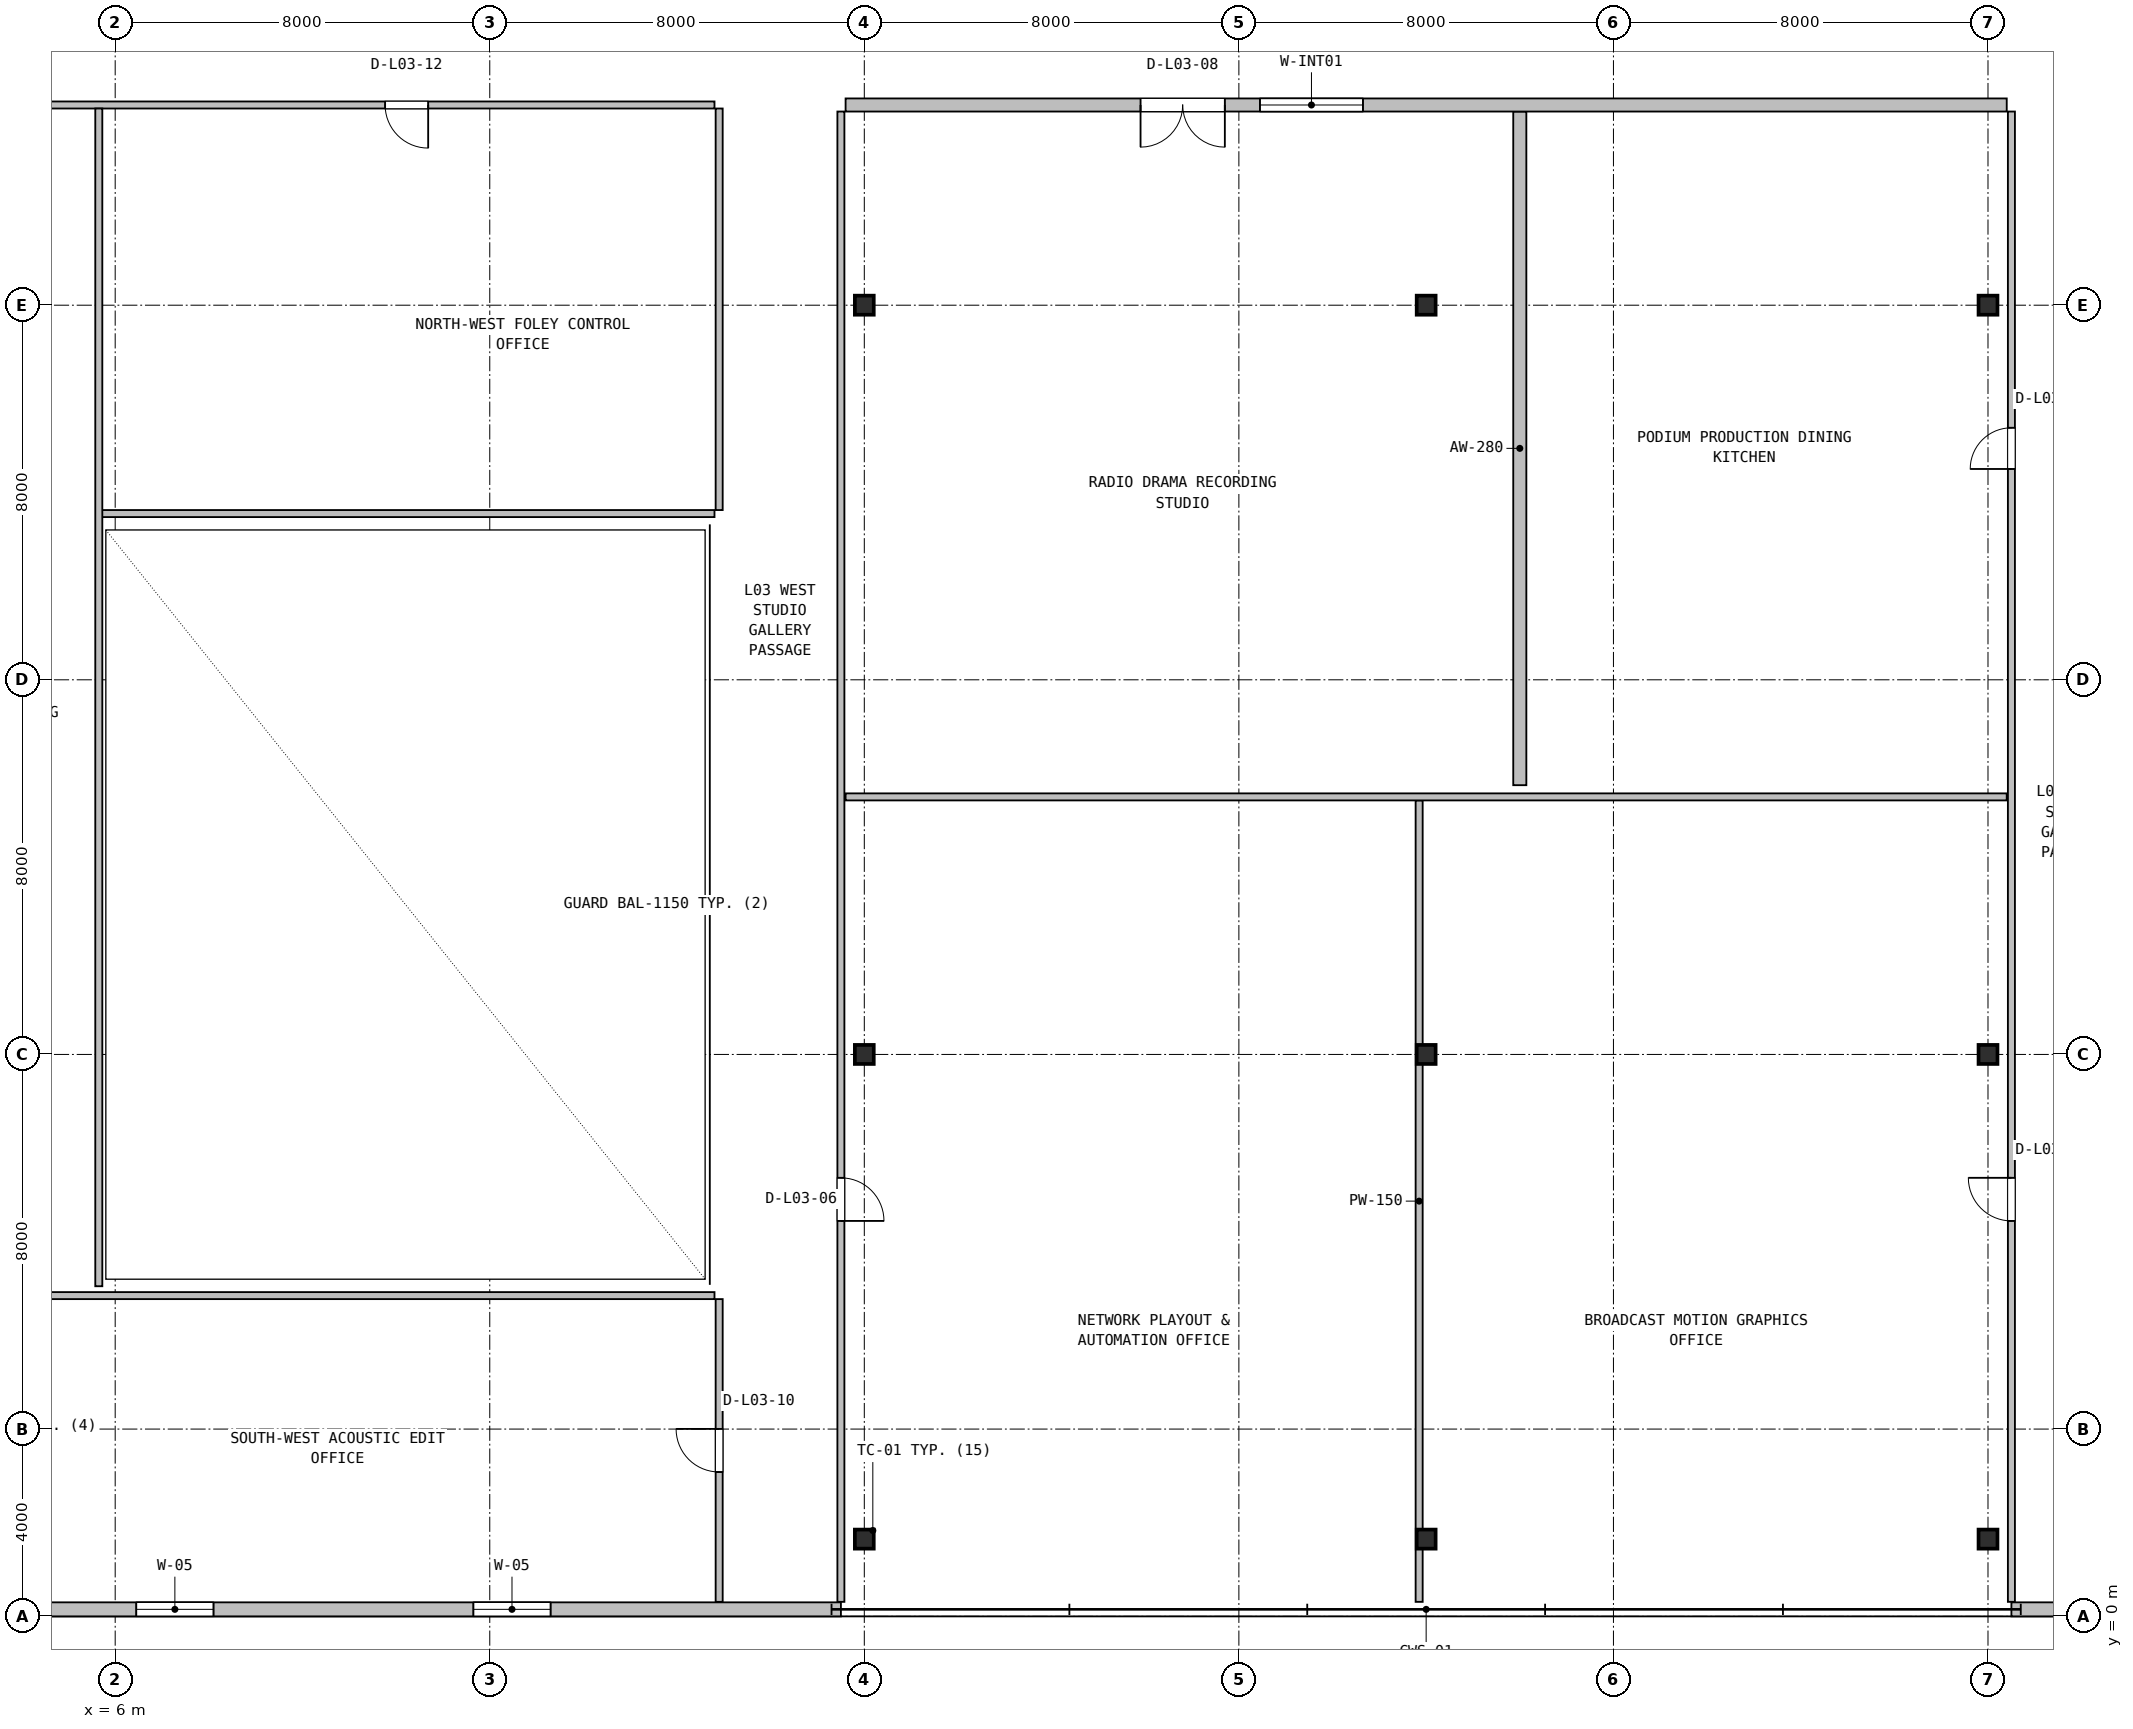
"""IFC4 building model, lengths in metres.
Left out: names, types, materials, properties, quantities, classifications, styles, units other than length and angle.
Written with IfcOpenShell. Run it as: python <this file> out.ifc"""

import sys

from ifc_helpers import new_model, si_unit, direction, frame, frame_2d, origin, origin_2d, place, context, subcontext, project, spatial, rectangle, i_section, extrude, source, transform, mapped, element, fill, save


model = new_model("IFC4")
c1 = context("Model", 3, precision=1e-05, world=origin(), true_north=direction((0.0, 1.0)))
c2 = subcontext(c1, "Body", "Model", "MODEL_VIEW")
j1 = project(units=[si_unit("LENGTHUNIT", "METRE"), si_unit("PLANEANGLEUNIT", "RADIAN")], contexts=[c1])
p1 = place(None, origin())
s1 = spatial("IfcSite", under=j1, at=p1, CompositionType="ELEMENT")
p2 = place(p1, origin())
s2 = spatial("IfcBuilding", under=s1, at=p2, CompositionType="ELEMENT")
p3 = place(p2, frame((0.0, 0.0, 16.8)))
s3 = spatial("IfcBuildingStorey", under=s2, at=p3, CompositionType="ELEMENT", Elevation=16.8)
m1 = source(origin(), c2, "Body", "SweptSolid", [
    extrude(i_section(OverallWidth=0.404, OverallDepth=0.407, WebThickness=0.027, FlangeThickness=0.044, FilletRadius=0.018, at=origin_2d()), origin(), (0.0, 0.0, 1.0), 5.4),
])
for number, where, z_axis, x_axis in (
    (1, (22.0, 1.65, 0.0), (0.0, 0.0, 1.0), (1.0, 0.0, 0.0)),
    (2, (34.0, 1.65, 0.0), (0.0, 0.0, 1.0), (1.0, 0.0, 0.0)),
    (3, (46.0, 1.65, 0.0), (0.0, 0.0, 1.0), (1.0, 0.0, 0.0)),
    (4, (22.0, 12.0, 0.0), (0.0, 0.0, 1.0), (1.0, 0.0, 0.0)),
    (5, (34.0, 12.0, 0.0), (0.0, 0.0, 1.0), (1.0, 0.0, 0.0)),
    (6, (46.0, 12.0, 0.0), (0.0, 0.0, 1.0), (1.0, 0.0, 0.0)),
    (7, (22.0, 28.0, 0.0), (0.0, 0.0, 1.0), (1.0, 0.0, 0.0)),
    (8, (34.0, 28.0, 0.0), (0.0, 0.0, 1.0), (1.0, 0.0, 0.0)),
    (9, (46.0, 28.0, 0.0), (0.0, 0.0, 1.0), (1.0, 0.0, 0.0)),
):
    element("IfcColumn", number, at=place(p3, frame(where, z_axis=z_axis, x_axis=x_axis)), inside=s3, PredefinedType="COLUMN", context=c2, shape_type="MappedRepresentation", body=[
        mapped(m1, transform((0.0, 0.0, 0.0), x_axis=(1.0, 0.0, 0.0), y_axis=(0.0, 1.0, 0.0), z_axis=(0.0, 0.0, 1.0), scale=1.0)),
    ])
p4 = place(p3, frame((2.25, 0.15, 0.0), z_axis=(0.0, 0.0, 1.0), x_axis=(1.0, 0.0, 0.0)))
e10 = element("IfcWall", 10, at=p4, inside=s3, PredefinedType="SOLIDWALL", context=c2, shape_type="SweptSolid", body=[
    extrude(rectangle(XDim=19.25, YDim=0.3, at=frame_2d((9.625, 0.0))), origin(), (0.0, 0.0, 1.0), 5.06),
])
p5 = place(p4, frame((4.2, 0.0, 0.9)))
e11 = element("IfcOpeningElement", 11, at=p5, cuts=e10, PredefinedType="OPENING", context=c2, shape_type="SweptSolid", body=[
    extrude(rectangle(XDim=1.65, YDim=1.8, at=frame_2d((0.825, 0.9))), frame((0.0, 0.16, 0.0), z_axis=(0.0, -1.0, 0.0), x_axis=(1.0, 0.0, 0.0)), (0.0, 0.0, 1.0), 0.32),
])
p6 = place(p4, frame((11.4, 0.0, 0.9)))
e12 = element("IfcOpeningElement", 12, at=p6, cuts=e10, PredefinedType="OPENING", context=c2, shape_type="SweptSolid", body=[
    extrude(rectangle(XDim=1.65, YDim=1.8, at=frame_2d((0.825, 0.9))), frame((0.0, 0.16, 0.0), z_axis=(0.0, -1.0, 0.0), x_axis=(1.0, 0.0, 0.0)), (0.0, 0.0, 1.0), 0.32),
])
p7 = place(p3, frame((46.5, 0.15, 0.0), z_axis=(0.0, 0.0, 1.0), x_axis=(1.0, 0.0, 0.0)))
e13 = element("IfcWall", 13, at=p7, inside=s3, PredefinedType="SOLIDWALL", context=c2, shape_type="SweptSolid", body=[
    extrude(rectangle(XDim=19.25, YDim=0.3, at=frame_2d((9.625, 0.0))), origin(), (0.0, 0.0, 1.0), 5.06),
])
p8 = place(p7, frame((4.2, 0.0, 0.9)))
e14 = element("IfcOpeningElement", 14, at=p8, cuts=e13, PredefinedType="OPENING", context=c2, shape_type="SweptSolid", body=[
    extrude(rectangle(XDim=1.65, YDim=1.8, at=frame_2d((0.825, 0.9))), frame((0.0, 0.16, 0.0), z_axis=(0.0, -1.0, 0.0), x_axis=(1.0, 0.0, 0.0)), (0.0, 0.0, 1.0), 0.32),
])
p9 = place(p7, frame((11.4, 0.0, 0.9)))
e15 = element("IfcOpeningElement", 15, at=p9, cuts=e13, PredefinedType="OPENING", context=c2, shape_type="SweptSolid", body=[
    extrude(rectangle(XDim=1.65, YDim=1.8, at=frame_2d((0.825, 0.9))), frame((0.0, 0.16, 0.0), z_axis=(0.0, -1.0, 0.0), x_axis=(1.0, 0.0, 0.0)), (0.0, 0.0, 1.0), 0.32),
])
p10 = place(p3, frame((33.85, 0.31, 0.0), z_axis=(0.0, 0.0, 1.0), x_axis=(0.0, 1.0, 0.0)))
e16 = element("IfcWall", 16, at=p10, inside=s3, PredefinedType="PARTITIONING", context=c2, shape_type="SweptSolid", body=[
    extrude(rectangle(XDim=17.115, YDim=0.15, at=frame_2d((8.558, 0.0))), origin(), (0.0, 0.0, 1.0), 4.143),
])
p11 = place(p3, frame((21.6, 17.5, 0.0), z_axis=(0.0, 0.0, 1.0), x_axis=(1.0, 0.0, 0.0)))
e17 = element("IfcWall", 17, at=p11, inside=s3, PredefinedType="PARTITIONING", context=c2, shape_type="SweptSolid", body=[
    extrude(rectangle(XDim=24.8, YDim=0.15, at=frame_2d((12.4, 0.0))), origin(), (0.0, 0.0, 1.0), 4.143),
])
p12 = place(p3, frame((21.5, 0.31, 0.0), z_axis=(0.0, 0.0, 1.0), x_axis=(0.0, 1.0, 0.0)))
e18 = element("IfcWall", 18, at=p12, inside=s3, PredefinedType="PARTITIONING", context=c2, shape_type="SweptSolid", body=[
    extrude(rectangle(XDim=31.825, YDim=0.15, at=frame_2d((15.913, 0.0))), origin(), (0.0, 0.0, 1.0), 4.143),
])
p13 = place(p12, frame((8.135, 0.0, 0.0)))
e19 = element("IfcOpeningElement", 19, at=p13, cuts=e18, PredefinedType="OPENING", context=c2, shape_type="SweptSolid", body=[
    extrude(rectangle(XDim=0.92, YDim=2.08, at=frame_2d((0.46, 1.04))), frame((0.0, 0.085, 0.0), z_axis=(0.0, -1.0, 0.0), x_axis=(1.0, 0.0, 0.0)), (0.0, 0.0, 1.0), 0.17),
])
p14 = place(p3, frame((46.5, 0.31, 0.0), z_axis=(0.0, 0.0, 1.0), x_axis=(0.0, 1.0, 0.0)))
e20 = element("IfcWall", 20, at=p14, inside=s3, PredefinedType="PARTITIONING", context=c2, shape_type="SweptSolid", body=[
    extrude(rectangle(XDim=31.825, YDim=0.15, at=frame_2d((15.913, 0.0))), origin(), (0.0, 0.0, 1.0), 4.143),
])
p15 = place(p14, frame((8.135, 0.0, 0.0)))
e21 = element("IfcOpeningElement", 21, at=p15, cuts=e20, PredefinedType="OPENING", context=c2, shape_type="SweptSolid", body=[
    extrude(rectangle(XDim=0.92, YDim=2.08, at=frame_2d((0.46, 1.04))), frame((0.0, 0.085, 0.0), z_axis=(0.0, -1.0, 0.0), x_axis=(1.0, 0.0, 0.0)), (0.0, 0.0, 1.0), 0.17),
])
p16 = place(p14, frame((24.192, 0.0, 0.0)))
e22 = element("IfcOpeningElement", 22, at=p16, cuts=e20, PredefinedType="OPENING", context=c2, shape_type="SweptSolid", body=[
    extrude(rectangle(XDim=0.88, YDim=2.06, at=frame_2d((0.44, 1.03))), frame((0.0, 0.085, 0.0), z_axis=(0.0, -1.0, 0.0), x_axis=(1.0, 0.0, 0.0)), (0.0, 0.0, 1.0), 0.17),
])
p17 = place(p3, frame((36.0, 17.75, 0.0), z_axis=(0.0, 0.0, 1.0), x_axis=(0.0, 1.0, 0.0)))
e23 = element("IfcWall", 23, at=p17, inside=s3, PredefinedType="SOLIDWALL", context=c2, shape_type="SweptSolid", body=[
    extrude(rectangle(XDim=14.385, YDim=0.28, at=frame_2d((7.192, 0.0))), origin(), (0.0, 0.0, 1.0), 4.143),
])
p18 = place(p3, frame((21.6, 32.275, 0.0), z_axis=(0.0, 0.0, 1.0), x_axis=(1.0, 0.0, 0.0)))
e24 = element("IfcWall", 24, at=p18, inside=s3, PredefinedType="SOLIDWALL", context=c2, shape_type="SweptSolid", body=[
    extrude(rectangle(XDim=24.8, YDim=0.28, at=frame_2d((12.4, 0.0))), origin(), (0.0, 0.0, 1.0), 4.143),
])
p19 = place(p18, frame((6.3, 0.0, 0.0)))
e25 = element("IfcOpeningElement", 25, at=p19, cuts=e24, PredefinedType="OPENING", context=c2, shape_type="SweptSolid", body=[
    extrude(rectangle(XDim=1.8, YDim=2.25, at=frame_2d((0.9, 1.125))), frame((0.0, 0.15, 0.0), z_axis=(0.0, -1.0, 0.0), x_axis=(1.0, 0.0, 0.0)), (0.0, 0.0, 1.0), 0.3),
])
p20 = place(p18, frame((8.85, 0.0, 0.95)))
e26 = element("IfcOpeningElement", 26, at=p20, cuts=e24, PredefinedType="OPENING", context=c2, shape_type="SweptSolid", body=[
    extrude(rectangle(XDim=2.2, YDim=1.3, at=frame_2d((1.1, 0.65))), frame((0.0, 0.15, 0.0), z_axis=(0.0, -1.0, 0.0), x_axis=(1.0, 0.0, 0.0)), (0.0, 0.0, 1.0), 0.3),
])
p21 = place(p3, frame((18.9, 0.31, 0.0), z_axis=(0.0, 0.0, 1.0), x_axis=(0.0, 1.0, 0.0)))
e27 = element("IfcWall", 27, at=p21, inside=s3, PredefinedType="PARTITIONING", context=c2, shape_type="SweptSolid", body=[
    extrude(rectangle(XDim=6.465, YDim=0.15, at=frame_2d((3.232, 0.0))), origin(), (0.0, 0.0, 1.0), 4.143),
])
p22 = place(p21, frame((2.773, 0.0, 0.0)))
e28 = element("IfcOpeningElement", 28, at=p22, cuts=e27, PredefinedType="OPENING", context=c2, shape_type="SweptSolid", body=[
    extrude(rectangle(XDim=0.92, YDim=2.08, at=frame_2d((0.46, 1.04))), frame((0.0, 0.085, 0.0), z_axis=(0.0, -1.0, 0.0), x_axis=(1.0, 0.0, 0.0)), (0.0, 0.0, 1.0), 0.17),
])
p23 = place(p3, frame((0.31, 6.85, 0.0), z_axis=(0.0, 0.0, 1.0), x_axis=(1.0, 0.0, 0.0)))
e29 = element("IfcWall", 29, at=p23, inside=s3, PredefinedType="PARTITIONING", context=c2, shape_type="SweptSolid", body=[
    extrude(rectangle(XDim=18.49, YDim=0.15, at=frame_2d((9.245, 0.0))), origin(), (0.0, 0.0, 1.0), 4.143),
])
p24 = place(p3, frame((5.65, 23.55, 0.0), z_axis=(0.0, 0.0, 1.0), x_axis=(1.0, 0.0, 0.0)))
e30 = element("IfcWall", 30, at=p24, inside=s3, PredefinedType="PARTITIONING", context=c2, shape_type="SweptSolid", body=[
    extrude(rectangle(XDim=13.15, YDim=0.15, at=frame_2d((6.575, 0.0))), origin(), (0.0, 0.0, 1.0), 5.06),
])
p25 = place(p3, frame((18.9, 23.625, 0.0), z_axis=(0.0, 0.0, 1.0), x_axis=(0.0, 1.0, 0.0)))
e31 = element("IfcWall", 31, at=p25, inside=s3, PredefinedType="PARTITIONING", context=c2, shape_type="SweptSolid", body=[
    extrude(rectangle(XDim=8.575, YDim=0.15, at=frame_2d((4.288, 0.0))), origin(), (0.0, 0.0, 1.0), 4.143),
])
p26 = place(p3, frame((0.31, 32.275, 0.0), z_axis=(0.0, 0.0, 1.0), x_axis=(1.0, 0.0, 0.0)))
e32 = element("IfcWall", 32, at=p26, inside=s3, PredefinedType="PARTITIONING", context=c2, shape_type="SweptSolid", body=[
    extrude(rectangle(XDim=18.49, YDim=0.15, at=frame_2d((9.245, 0.0))), origin(), (0.0, 0.0, 1.0), 4.143),
])
p27 = place(p26, frame((11.455, 0.0, 0.0)))
e33 = element("IfcOpeningElement", 33, at=p27, cuts=e32, PredefinedType="OPENING", context=c2, shape_type="SweptSolid", body=[
    extrude(rectangle(XDim=0.92, YDim=2.08, at=frame_2d((0.46, 1.04))), frame((0.0, 0.085, 0.0), z_axis=(0.0, -1.0, 0.0), x_axis=(1.0, 0.0, 0.0)), (0.0, 0.0, 1.0), 0.17),
])
p28 = place(p26, frame((2.11, 0.0, 0.0)))
e34 = element("IfcOpeningElement", 34, at=p28, cuts=e32, PredefinedType="OPENING", context=c2, shape_type="SweptSolid", body=[
    extrude(rectangle(XDim=0.92, YDim=2.08, at=frame_2d((0.46, 1.04))), frame((0.0, 0.085, 0.0), z_axis=(0.0, -1.0, 0.0), x_axis=(1.0, 0.0, 0.0)), (0.0, 0.0, 1.0), 0.17),
])
p29 = place(p3, frame((5.65, 7.05, 0.0), z_axis=(0.0, 0.0, 1.0), x_axis=(0.0, 1.0, 0.0)))
e35 = element("IfcWall", 35, at=p29, inside=s3, PredefinedType="PARTITIONING", context=c2, shape_type="SweptSolid", body=[
    extrude(rectangle(XDim=25.15, YDim=0.15, at=frame_2d((12.575, 0.0))), origin(), (0.0, 0.0, 1.0), 4.143),
])
m2 = source(origin(), c2, "Body", "SweptSolid", [
    extrude(rectangle(XDim=1.65, YDim=1.8, at=frame_2d((0.825, 0.9))), frame((0.0, 0.03, 0.0), z_axis=(0.0, -1.0, 0.0), x_axis=(1.0, 0.0, 0.0)), (0.0, 0.0, 1.0), 0.06),
])
p30 = place(p5, origin())
e36 = element("IfcWindow", 36, at=p30, inside=s3, PartitioningType="SINGLE_PANEL", PredefinedType="WINDOW", context=c2, shape_type="MappedRepresentation", body=[
    mapped(m2, transform((0.0, 0.0, 0.0), x_axis=(1.0, 0.0, 0.0), y_axis=(0.0, 1.0, 0.0), z_axis=(0.0, 0.0, 1.0), scale=1.0)),
])
fill(e11, e36)
p31 = place(p6, origin())
e37 = element("IfcWindow", 37, at=p31, inside=s3, PartitioningType="SINGLE_PANEL", PredefinedType="WINDOW", context=c2, shape_type="MappedRepresentation", body=[
    mapped(m2, transform((0.0, 0.0, 0.0), x_axis=(1.0, 0.0, 0.0), y_axis=(0.0, 1.0, 0.0), z_axis=(0.0, 0.0, 1.0), scale=1.0)),
])
fill(e12, e37)
m3 = source(origin(), c2, "Body", "SweptSolid", [
    extrude(rectangle(XDim=0.92, YDim=2.08, at=frame_2d((0.46, 1.04))), frame((0.0, 0.025, 0.0), z_axis=(0.0, -1.0, 0.0), x_axis=(1.0, 0.0, 0.0)), (0.0, 0.0, 1.0), 0.05),
])
p32 = place(p13, frame((0.92, 0.0, 0.0), z_axis=(0.0, 0.0, 1.0), x_axis=(-1.0, 0.0, 0.0)))
e38 = element("IfcDoor", 38, at=p32, inside=s3, OperationType="SINGLE_SWING_LEFT", PredefinedType="DOOR", context=c2, shape_type="MappedRepresentation", body=[
    mapped(m3, transform((0.0, 0.0, 0.0), x_axis=(1.0, 0.0, 0.0), y_axis=(0.0, 1.0, 0.0), z_axis=(0.0, 0.0, 1.0), scale=1.0)),
])
fill(e19, e38)
p33 = place(p15, origin())
e39 = element("IfcDoor", 39, at=p33, inside=s3, OperationType="SINGLE_SWING_RIGHT", PredefinedType="DOOR", context=c2, shape_type="MappedRepresentation", body=[
    mapped(m3, transform((0.0, 0.0, 0.0), x_axis=(1.0, 0.0, 0.0), y_axis=(0.0, 1.0, 0.0), z_axis=(0.0, 0.0, 1.0), scale=1.0)),
])
fill(e21, e39)
m4 = source(origin(), c2, "Body", "SweptSolid", [
    extrude(rectangle(XDim=0.88, YDim=2.06, at=frame_2d((0.44, 1.03))), frame((0.0, 0.025, 0.0), z_axis=(0.0, -1.0, 0.0), x_axis=(1.0, 0.0, 0.0)), (0.0, 0.0, 1.0), 0.05),
])
p34 = place(p16, origin())
e40 = element("IfcDoor", 40, at=p34, inside=s3, OperationType="SINGLE_SWING_LEFT", PredefinedType="DOOR", context=c2, shape_type="MappedRepresentation", body=[
    mapped(m4, transform((0.0, 0.0, 0.0), x_axis=(1.0, 0.0, 0.0), y_axis=(0.0, 1.0, 0.0), z_axis=(0.0, 0.0, 1.0), scale=1.0)),
])
fill(e22, e40)
m5 = source(origin(), c2, "Body", "SweptSolid", [
    extrude(rectangle(XDim=1.8, YDim=2.25, at=frame_2d((0.9, 1.125))), frame((0.0, 0.025, 0.0), z_axis=(0.0, -1.0, 0.0), x_axis=(1.0, 0.0, 0.0)), (0.0, 0.0, 1.0), 0.05),
])
p35 = place(p19, frame((1.8, 0.0, 0.0), z_axis=(0.0, 0.0, 1.0), x_axis=(-1.0, 0.0, 0.0)))
e41 = element("IfcDoor", 41, at=p35, inside=s3, OperationType="DOUBLE_DOOR_SINGLE_SWING", PredefinedType="DOOR", context=c2, shape_type="MappedRepresentation", body=[
    mapped(m5, transform((0.0, 0.0, 0.0), x_axis=(1.0, 0.0, 0.0), y_axis=(0.0, 1.0, 0.0), z_axis=(0.0, 0.0, 1.0), scale=1.0)),
])
fill(e25, e41)
m6 = source(origin(), c2, "Body", "SweptSolid", [
    extrude(rectangle(XDim=2.2, YDim=1.3, at=frame_2d((1.1, 0.65))), frame((0.0, 0.03, 0.0), z_axis=(0.0, -1.0, 0.0), x_axis=(1.0, 0.0, 0.0)), (0.0, 0.0, 1.0), 0.06),
])
p36 = place(p20, origin())
e42 = element("IfcWindow", 42, at=p36, inside=s3, PartitioningType="SINGLE_PANEL", PredefinedType="WINDOW", context=c2, shape_type="MappedRepresentation", body=[
    mapped(m6, transform((0.0, 0.0, 0.0), x_axis=(1.0, 0.0, 0.0), y_axis=(0.0, 1.0, 0.0), z_axis=(0.0, 0.0, 1.0), scale=1.0)),
])
fill(e26, e42)
p37 = place(p22, origin())
e43 = element("IfcDoor", 43, at=p37, inside=s3, OperationType="SINGLE_SWING_RIGHT", PredefinedType="DOOR", context=c2, shape_type="MappedRepresentation", body=[
    mapped(m3, transform((0.0, 0.0, 0.0), x_axis=(1.0, 0.0, 0.0), y_axis=(0.0, 1.0, 0.0), z_axis=(0.0, 0.0, 1.0), scale=1.0)),
])
fill(e28, e43)
p38 = place(p27, frame((0.92, 0.0, 0.0), z_axis=(0.0, 0.0, 1.0), x_axis=(-1.0, 0.0, 0.0)))
e44 = element("IfcDoor", 44, at=p38, inside=s3, OperationType="SINGLE_SWING_RIGHT", PredefinedType="DOOR", context=c2, shape_type="MappedRepresentation", body=[
    mapped(m3, transform((0.0, 0.0, 0.0), x_axis=(1.0, 0.0, 0.0), y_axis=(0.0, 1.0, 0.0), z_axis=(0.0, 0.0, 1.0), scale=1.0)),
])
fill(e33, e44)
save(model, sys.argv[1])
